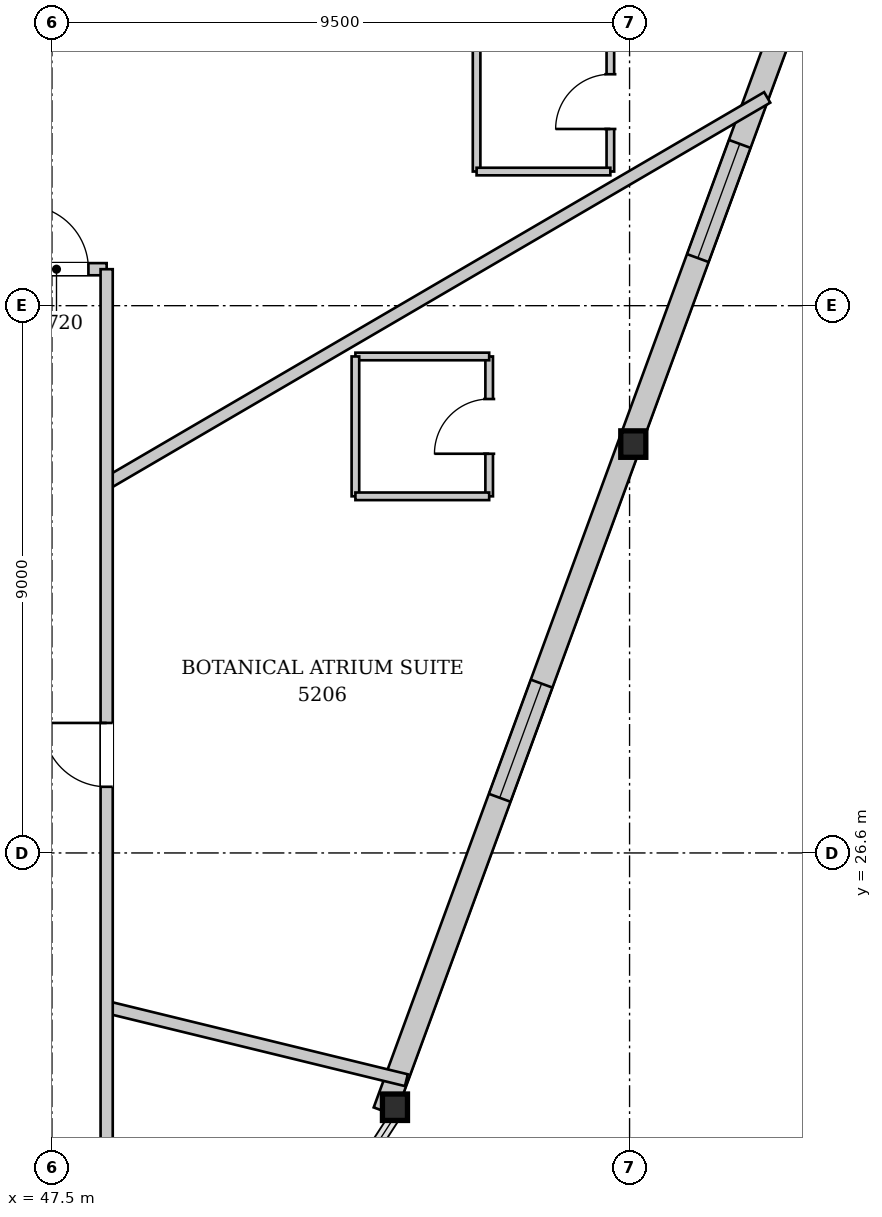
"""IFC4 building model, lengths in metres.
Left out: names, types, materials, properties, quantities, classifications, styles, units other than length and angle.
Written with IfcOpenShell. Run it as: python <this file> out.ifc"""

import sys

from ifc_helpers import new_model, si_unit, direction, frame, frame_2d, origin, origin_2d, place, context, subcontext, project, spatial, rectangle, i_section, extrude, source, transform, mapped, element, fill, save


model = new_model("IFC4")
c1 = context("Model", 3, precision=1e-05, world=origin(), true_north=direction((0.0, 1.0)))
c2 = subcontext(c1, "Body", "Model", "MODEL_VIEW")
j1 = project(units=[si_unit("LENGTHUNIT", "METRE"), si_unit("PLANEANGLEUNIT", "RADIAN")], contexts=[c1])
p1 = place(None, origin())
s1 = spatial("IfcSite", under=j1, at=p1, CompositionType="ELEMENT")
p2 = place(p1, origin())
s2 = spatial("IfcBuilding", under=s1, at=p2, CompositionType="ELEMENT")
p3 = place(p2, frame((0.0, 0.0, 196.3)))
s3 = spatial("IfcBuildingStorey", under=s2, at=p3, CompositionType="ELEMENT", Elevation=196.3)
m1 = source(origin(), c2, "Body", "SweptSolid", [
    extrude(i_section(OverallWidth=0.412, OverallDepth=0.435, WebThickness=0.031, FlangeThickness=0.05, at=origin_2d()), origin(), (0.0, 0.0, 1.0), 3.844),
])
p4 = place(p3, frame((53.149, 22.284, 0.0), z_axis=(-0.003746862239, 0.069793247462, 0.997554441438), x_axis=(-0.99856205882, -0.053607972221, 0.0)))
e1 = element("IfcColumn", 1, at=p4, inside=s3, PredefinedType="COLUMN", context=c2, shape_type="MappedRepresentation", body=[
    mapped(m1, transform((0.0, 0.0, 0.0), x_axis=(1.0, 0.0, 0.0), y_axis=(0.0, 1.0, 0.0), z_axis=(0.0, 0.0, 1.0), scale=1.0)),
])
m2 = source(origin(), c2, "Body", "SweptSolid", [
    extrude(i_section(OverallWidth=0.412, OverallDepth=0.435, WebThickness=0.031, FlangeThickness=0.05, at=origin_2d()), origin(), (0.0, 0.0, 1.0), 3.851),
])
p5 = place(p3, frame((57.146, 33.17, 0.0), z_axis=(-0.043744108522, 0.079880545996, 0.995844140085), x_axis=(-0.877096267842, -0.480314622866, 0.0)))
e2 = element("IfcColumn", 2, at=p5, inside=s3, PredefinedType="COLUMN", context=c2, shape_type="MappedRepresentation", body=[
    mapped(m2, transform((0.0, 0.0, 0.0), x_axis=(1.0, 0.0, 0.0), y_axis=(0.0, 1.0, 0.0), z_axis=(0.0, 0.0, 1.0), scale=1.0)),
])
p6 = place(p3, frame((60.964, 44.122, 0.0), z_axis=(0.0, 0.0, 1.0), x_axis=(-0.344663194366, -0.938726415123, 0.0)))
e3 = element("IfcWall", 3, at=p6, inside=s3, PredefinedType="SOLIDWALL", context=c2, shape_type="SweptSolid", body=[
    extrude(rectangle(XDim=23.193, YDim=0.38, at=frame_2d((11.597, 0.0))), origin(), (0.0, 0.0, 1.0), 3.172),
])
p7 = place(p6, frame((6.244, 0.0, 0.252)))
e4 = element("IfcOpeningElement", 4, at=p7, cuts=e3, PredefinedType="OPENING", context=c2, shape_type="SweptSolid", body=[
    extrude(rectangle(XDim=2.0, YDim=2.8, at=frame_2d((1.0, 1.4))), frame((0.0, 0.2, 0.0), z_axis=(0.0, -1.0, 0.0), x_axis=(1.0, 0.0, 0.0)), (0.0, 0.0, 1.0), 0.4),
])
p8 = place(p6, frame((15.699, 0.0, 0.252)))
e5 = element("IfcOpeningElement", 5, at=p8, cuts=e3, PredefinedType="OPENING", context=c2, shape_type="SweptSolid", body=[
    extrude(rectangle(XDim=2.0, YDim=2.8, at=frame_2d((1.0, 1.4))), frame((0.0, 0.2, 0.0), z_axis=(0.0, -1.0, 0.0), x_axis=(1.0, 0.0, 0.0)), (0.0, 0.0, 1.0), 0.4),
])
p9 = place(p3, frame((48.4, 24.065, 0.0), z_axis=(0.0, 0.0, 1.0), x_axis=(0.971549510185, -0.236836545447, 0.0)))
e6 = element("IfcWall", 6, at=p9, inside=s3, PredefinedType="PARTITIONING", context=c2, shape_type="SweptSolid", body=[
    extrude(rectangle(XDim=5.074, YDim=0.2, at=frame_2d((2.537, 0.0))), origin(), (0.0, 0.0, 1.0), 3.315),
])
p10 = place(p3, frame((48.4, 32.677, 0.0), z_axis=(0.0, 0.0, 1.0), x_axis=(0.863398619096, 0.504522372688, 0.0)))
e7 = element("IfcWall", 7, at=p10, inside=s3, PredefinedType="PARTITIONING", context=c2, shape_type="SweptSolid", body=[
    extrude(rectangle(XDim=12.582, YDim=0.2, at=frame_2d((6.291, 0.0))), origin(), (0.0, 0.0, 1.0), 3.78),
])
p11 = place(p3, frame((54.691, 32.465, 0.0), z_axis=(0.0, 0.0, 1.0), x_axis=(0.0, 1.0, 0.0)))
e8 = element("IfcWall", 8, at=p11, inside=s3, PredefinedType="PARTITIONING", context=c2, shape_type="SweptSolid", body=[
    extrude(rectangle(XDim=2.3, YDim=0.125, at=frame_2d((1.15, 0.0))), origin(), (0.0, 0.0, 1.0), 3.78),
])
p12 = place(p11, frame((0.7, 0.0, 0.0)))
e9 = element("IfcOpeningElement", 9, at=p12, cuts=e8, PredefinedType="OPENING", context=c2, shape_type="SweptSolid", body=[
    extrude(rectangle(XDim=0.9, YDim=2.1, at=frame_2d((0.45, 1.05))), frame((0.0, 0.073, 0.0), z_axis=(0.0, -1.0, 0.0), x_axis=(1.0, 0.0, 0.0)), (0.0, 0.0, 1.0), 0.145),
])
p13 = place(p3, frame((54.691, 34.765, 0.0), z_axis=(0.0, 0.0, 1.0), x_axis=(-1.0, 0.0, 0.0)))
e10 = element("IfcWall", 10, at=p13, inside=s3, PredefinedType="PARTITIONING", context=c2, shape_type="SweptSolid", body=[
    extrude(rectangle(XDim=2.2, YDim=0.125, at=frame_2d((1.1, 0.0))), origin(), (0.0, 0.0, 1.0), 3.78),
])
p14 = place(p3, frame((52.491, 34.765, 0.0), z_axis=(0.0, 0.0, 1.0), x_axis=(0.0, -1.0, 0.0)))
e11 = element("IfcWall", 11, at=p14, inside=s3, PredefinedType="PARTITIONING", context=c2, shape_type="SweptSolid", body=[
    extrude(rectangle(XDim=2.3, YDim=0.125, at=frame_2d((1.15, 0.0))), origin(), (0.0, 0.0, 1.0), 3.78),
])
p15 = place(p3, frame((52.491, 32.465, 0.0), z_axis=(0.0, 0.0, 1.0), x_axis=(1.0, 0.0, 0.0)))
e12 = element("IfcWall", 12, at=p15, inside=s3, PredefinedType="PARTITIONING", context=c2, shape_type="SweptSolid", body=[
    extrude(rectangle(XDim=2.2, YDim=0.125, at=frame_2d((1.1, 0.0))), origin(), (0.0, 0.0, 1.0), 3.78),
])
p16 = place(p3, frame((56.684, 37.806, 0.0), z_axis=(0.0, 0.0, 1.0), x_axis=(0.0, 1.0, 0.0)))
e13 = element("IfcWall", 13, at=p16, inside=s3, PredefinedType="PARTITIONING", context=c2, shape_type="SweptSolid", body=[
    extrude(rectangle(XDim=2.3, YDim=0.125, at=frame_2d((1.15, 0.0))), origin(), (0.0, 0.0, 1.0), 3.78),
])
p17 = place(p16, frame((0.7, 0.0, 0.0)))
e14 = element("IfcOpeningElement", 14, at=p17, cuts=e13, PredefinedType="OPENING", context=c2, shape_type="SweptSolid", body=[
    extrude(rectangle(XDim=0.9, YDim=2.1, at=frame_2d((0.45, 1.05))), frame((0.0, 0.073, 0.0), z_axis=(0.0, -1.0, 0.0), x_axis=(1.0, 0.0, 0.0)), (0.0, 0.0, 1.0), 0.145),
])
p18 = place(p3, frame((54.484, 40.106, 0.0), z_axis=(0.0, 0.0, 1.0), x_axis=(0.0, -1.0, 0.0)))
e15 = element("IfcWall", 15, at=p18, inside=s3, PredefinedType="PARTITIONING", context=c2, shape_type="SweptSolid", body=[
    extrude(rectangle(XDim=2.3, YDim=0.125, at=frame_2d((1.15, 0.0))), origin(), (0.0, 0.0, 1.0), 3.78),
])
p19 = place(p3, frame((54.484, 37.806, 0.0), z_axis=(0.0, 0.0, 1.0), x_axis=(1.0, 0.0, 0.0)))
e16 = element("IfcWall", 16, at=p19, inside=s3, PredefinedType="PARTITIONING", context=c2, shape_type="SweptSolid", body=[
    extrude(rectangle(XDim=2.2, YDim=0.125, at=frame_2d((1.1, 0.0))), origin(), (0.0, 0.0, 1.0), 3.78),
])
p20 = place(p3, frame((43.4, 36.2, 0.0), z_axis=(0.0, 0.0, 1.0), x_axis=(1.0, 0.0, 0.0)))
e17 = element("IfcWall", 17, at=p20, inside=s3, PredefinedType="PARTITIONING", context=c2, shape_type="SweptSolid", body=[
    extrude(rectangle(XDim=5.0, YDim=0.2, at=frame_2d((2.5, 0.0))), origin(), (0.0, 0.0, 1.0), 3.78),
])
p21 = place(p20, frame((3.65, 0.0, 0.0)))
e18 = element("IfcOpeningElement", 18, at=p21, cuts=e17, PredefinedType="OPENING", context=c2, shape_type="SweptSolid", body=[
    extrude(rectangle(XDim=1.05, YDim=2.2, at=frame_2d((0.525, 1.1))), frame((0.0, 0.11, 0.0), z_axis=(0.0, -1.0, 0.0), x_axis=(1.0, 0.0, 0.0)), (0.0, 0.0, 1.0), 0.22),
])
p22 = place(p3, frame((48.4, 17.0, 0.0), z_axis=(0.0, 0.0, 1.0), x_axis=(0.0, 1.0, 0.0)))
e19 = element("IfcWall", 19, at=p22, inside=s3, PredefinedType="PARTITIONING", context=c2, shape_type="SweptSolid", body=[
    extrude(rectangle(XDim=19.2, YDim=0.2, at=frame_2d((9.6, 0.0))), origin(), (0.0, 0.0, 1.0), 3.78),
])
p23 = place(p22, frame((10.688, 0.0, 0.0)))
e20 = element("IfcOpeningElement", 20, at=p23, cuts=e19, PredefinedType="OPENING", context=c2, shape_type="SweptSolid", body=[
    extrude(rectangle(XDim=1.05, YDim=2.2, at=frame_2d((0.525, 1.1))), frame((0.0, 0.11, 0.0), z_axis=(0.0, -1.0, 0.0), x_axis=(1.0, 0.0, 0.0)), (0.0, 0.0, 1.0), 0.22),
])
m3 = source(origin(), c2, "Body", "SweptSolid", [
    extrude(rectangle(XDim=2.0, YDim=2.8, at=frame_2d((1.0, 1.4))), frame((0.0, 0.03, 0.0), z_axis=(0.0, -1.0, 0.0), x_axis=(1.0, 0.0, 0.0)), (0.0, 0.0, 1.0), 0.06),
])
p24 = place(p7, origin())
e21 = element("IfcWindow", 21, at=p24, inside=s3, PartitioningType="SINGLE_PANEL", PredefinedType="WINDOW", context=c2, shape_type="MappedRepresentation", body=[
    mapped(m3, transform((0.0, 0.0, 0.0), x_axis=(1.0, 0.0, 0.0), y_axis=(0.0, 1.0, 0.0), z_axis=(0.0, 0.0, 1.0), scale=1.0)),
])
fill(e4, e21)
p25 = place(p8, origin())
e22 = element("IfcWindow", 22, at=p25, inside=s3, PartitioningType="SINGLE_PANEL", PredefinedType="WINDOW", context=c2, shape_type="MappedRepresentation", body=[
    mapped(m3, transform((0.0, 0.0, 0.0), x_axis=(1.0, 0.0, 0.0), y_axis=(0.0, 1.0, 0.0), z_axis=(0.0, 0.0, 1.0), scale=1.0)),
])
fill(e5, e22)
m4 = source(origin(), c2, "Body", "SweptSolid", [
    extrude(rectangle(XDim=0.9, YDim=2.1, at=frame_2d((0.45, 1.05))), frame((0.0, 0.025, 0.0), z_axis=(0.0, -1.0, 0.0), x_axis=(1.0, 0.0, 0.0)), (0.0, 0.0, 1.0), 0.05),
])
p26 = place(p12, origin())
e23 = element("IfcDoor", 23, at=p26, inside=s3, OperationType="SINGLE_SWING_LEFT", PredefinedType="DOOR", context=c2, shape_type="MappedRepresentation", body=[
    mapped(m4, transform((0.0, 0.0, 0.0), x_axis=(1.0, 0.0, 0.0), y_axis=(0.0, 1.0, 0.0), z_axis=(0.0, 0.0, 1.0), scale=1.0)),
])
fill(e9, e23)
p27 = place(p17, origin())
e24 = element("IfcDoor", 24, at=p27, inside=s3, OperationType="SINGLE_SWING_LEFT", PredefinedType="DOOR", context=c2, shape_type="MappedRepresentation", body=[
    mapped(m4, transform((0.0, 0.0, 0.0), x_axis=(1.0, 0.0, 0.0), y_axis=(0.0, 1.0, 0.0), z_axis=(0.0, 0.0, 1.0), scale=1.0)),
])
fill(e14, e24)
m5 = source(origin(), c2, "Body", "SweptSolid", [
    extrude(rectangle(XDim=1.05, YDim=2.2, at=frame_2d((0.525, 1.1))), frame((0.0, 0.025, 0.0), z_axis=(0.0, -1.0, 0.0), x_axis=(1.0, 0.0, 0.0)), (0.0, 0.0, 1.0), 0.05),
])
p28 = place(p21, origin())
e25 = element("IfcDoor", 25, at=p28, inside=s3, OperationType="SINGLE_SWING_LEFT", PredefinedType="DOOR", context=c2, shape_type="MappedRepresentation", body=[
    mapped(m5, transform((0.0, 0.0, 0.0), x_axis=(1.0, 0.0, 0.0), y_axis=(0.0, 1.0, 0.0), z_axis=(0.0, 0.0, 1.0), scale=1.0)),
])
fill(e18, e25)
p29 = place(p23, origin())
e26 = element("IfcDoor", 26, at=p29, inside=s3, OperationType="SINGLE_SWING_RIGHT", PredefinedType="DOOR", context=c2, shape_type="MappedRepresentation", body=[
    mapped(m5, transform((0.0, 0.0, 0.0), x_axis=(1.0, 0.0, 0.0), y_axis=(0.0, 1.0, 0.0), z_axis=(0.0, 0.0, 1.0), scale=1.0)),
])
fill(e20, e26)
save(model, sys.argv[1])
